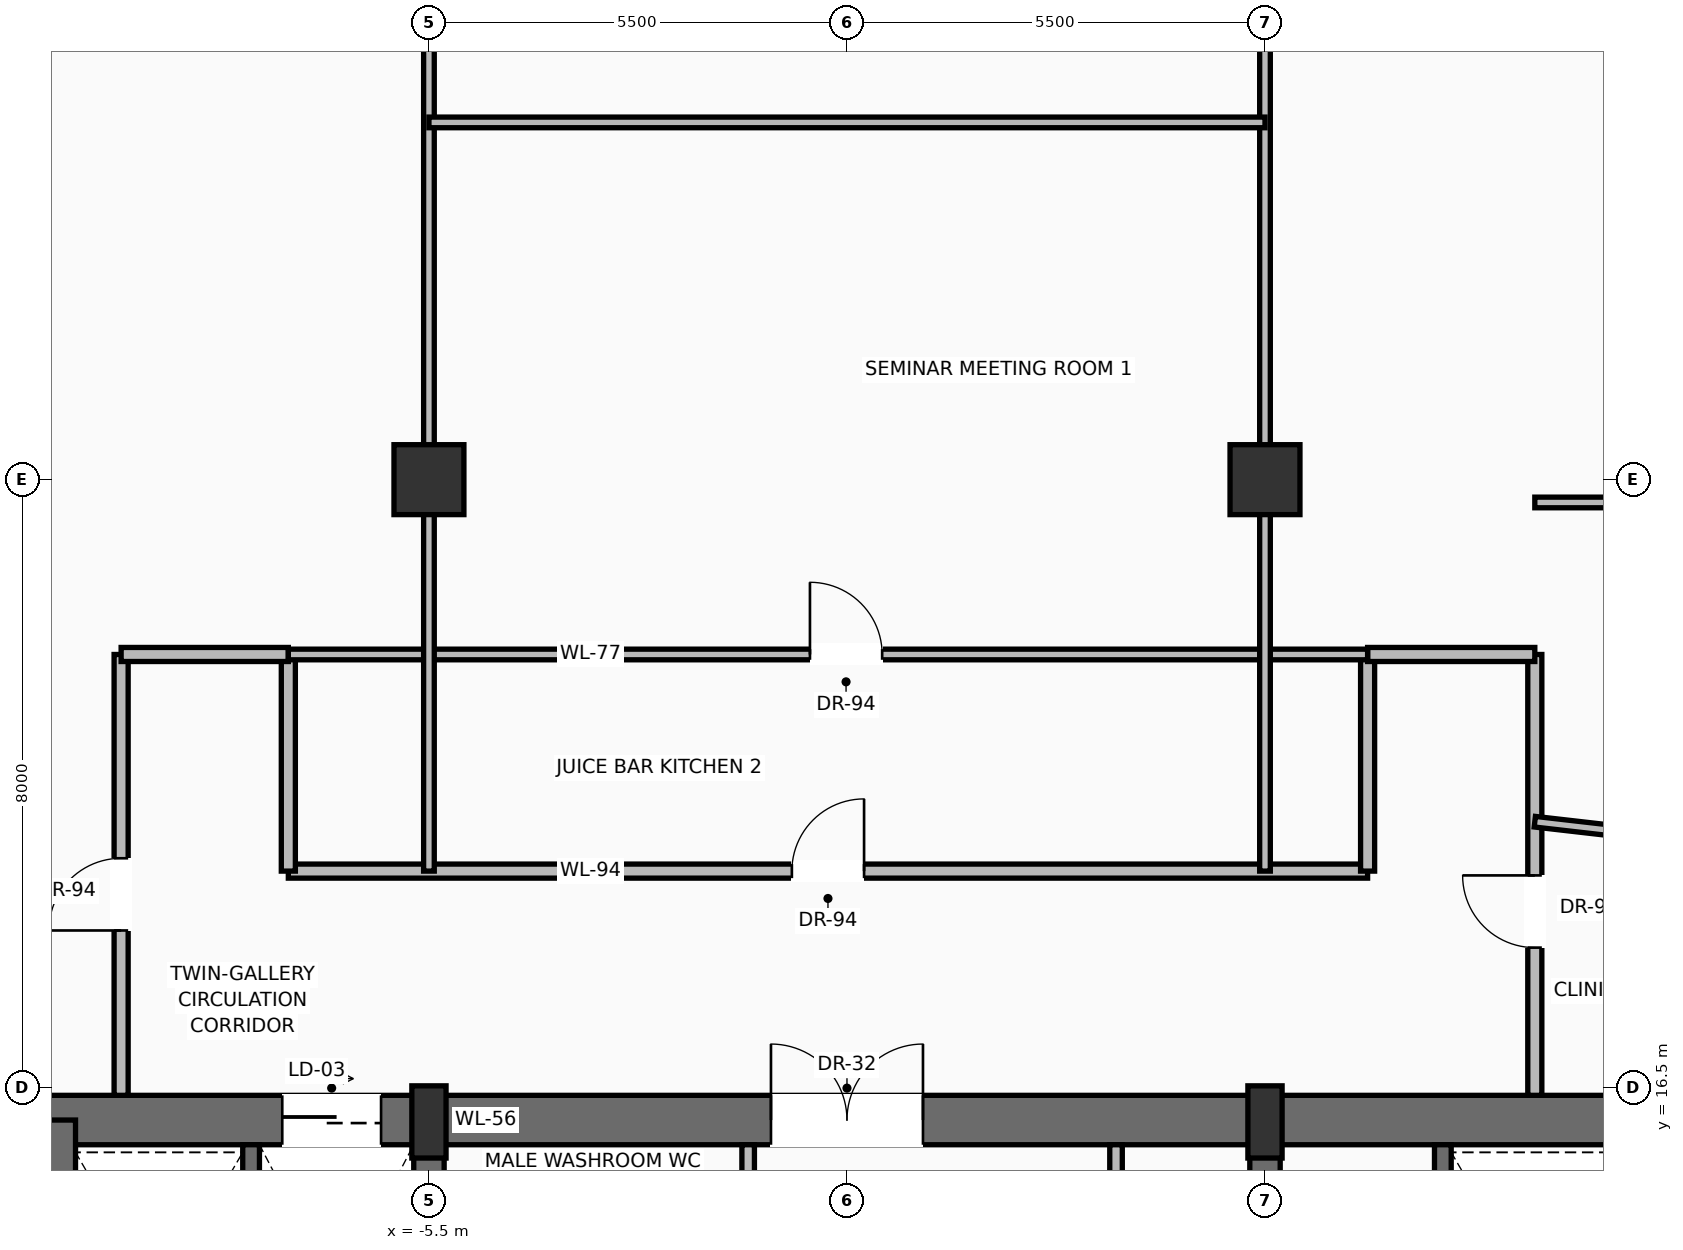
"""IFC4 building model, lengths in metres.
Left out: names, types, materials, properties, quantities, classifications, styles, units other than length and angle.
Written with IfcOpenShell. Run it as: python <this file> out.ifc"""

import sys

from ifc_helpers import new_model, si_unit, direction, frame, frame_2d, origin, origin_2d, place, context, subcontext, project, spatial, rectangle, extrude, source, transform, mapped, element, fill, save


model = new_model("IFC4")
c1 = context("Model", 3, precision=1e-05, world=origin(), true_north=direction((0.0, 1.0)))
c2 = subcontext(c1, "Body", "Model", "MODEL_VIEW")
j1 = project(units=[si_unit("LENGTHUNIT", "METRE"), si_unit("PLANEANGLEUNIT", "RADIAN")], contexts=[c1])
p1 = place(None, origin())
s1 = spatial("IfcSite", under=j1, at=p1, CompositionType="ELEMENT")
p2 = place(p1, origin())
s2 = spatial("IfcBuilding", under=s1, at=p2, CompositionType="ELEMENT")
p3 = place(p2, frame((0.0, 0.0, 196.9)))
s3 = spatial("IfcBuildingStorey", under=s2, at=p3, CompositionType="ELEMENT", Elevation=196.9)
p4 = place(p3, frame((-10.8, 16.075, 0.0), z_axis=(0.0, 0.0, 1.0), x_axis=(1.0, 0.0, 0.0)))
e1 = element("IfcWall", 1, at=p4, inside=s3, PredefinedType="SHEAR", context=c2, shape_type="SweptSolid", body=[
    extrude(rectangle(XDim=21.6, YDim=0.65, at=frame_2d((10.8, 0.0))), origin(), (0.0, 0.0, 1.0), 3.47),
])
p5 = place(p4, frame((3.37, 0.0, 0.0)))
e2 = element("IfcOpeningElement", 2, at=p5, cuts=e1, PredefinedType="OPENING", context=c2, shape_type="SweptSolid", body=[
    extrude(rectangle(XDim=1.3, YDim=2.3, at=frame_2d((0.65, 1.15))), frame((0.0, 0.335, 0.0), z_axis=(0.0, -1.0, 0.0), x_axis=(1.0, 0.0, 0.0)), (0.0, 0.0, 1.0), 0.67),
])
p6 = place(p4, frame((9.8, 0.0, 0.0)))
e3 = element("IfcOpeningElement", 3, at=p6, cuts=e1, PredefinedType="OPENING", context=c2, shape_type="SweptSolid", body=[
    extrude(rectangle(XDim=2.0, YDim=2.4, at=frame_2d((1.0, 1.2))), frame((0.0, 0.335, 0.0), z_axis=(0.0, -1.0, 0.0), x_axis=(1.0, 0.0, 0.0)), (0.0, 0.0, 1.0), 0.67),
])
p7 = place(p3, frame((-10.475, 0.525, 0.0), z_axis=(0.0, 0.0, 1.0), x_axis=(0.0, 1.0, 0.0)))
e4 = element("IfcWall", 4, at=p7, inside=s3, PredefinedType="SHEAR", context=c2, shape_type="SweptSolid", body=[
    extrude(rectangle(XDim=15.55, YDim=0.65, at=frame_2d((7.775, 0.0))), origin(), (0.0, 0.0, 1.0), 3.47),
])
p8 = place(p3, frame((-5.5, 0.525, 0.0), z_axis=(0.0, 0.0, 1.0), x_axis=(0.0, 1.0, 0.0)))
e5 = element("IfcWall", 5, at=p8, inside=s3, PredefinedType="SHEAR", context=c2, shape_type="SweptSolid", body=[
    extrude(rectangle(XDim=15.55, YDim=0.4, at=frame_2d((7.775, 0.0))), origin(), (0.0, 0.0, 1.0), 3.47),
])
p9 = place(p8, frame((8.975, 0.0, 0.0)))
e6 = element("IfcOpeningElement", 6, at=p9, cuts=e5, PredefinedType="OPENING", context=c2, shape_type="SweptSolid", body=[
    extrude(rectangle(XDim=1.1, YDim=2.2, at=frame_2d((0.55, 1.1))), frame((0.0, 0.21, 0.0), z_axis=(0.0, -1.0, 0.0), x_axis=(1.0, 0.0, 0.0)), (0.0, 0.0, 1.0), 0.42),
])
p10 = place(p3, frame((5.5, 0.525, 0.0), z_axis=(0.0, 0.0, 1.0), x_axis=(0.0, 1.0, 0.0)))
e7 = element("IfcWall", 7, at=p10, inside=s3, PredefinedType="SHEAR", context=c2, shape_type="SweptSolid", body=[
    extrude(rectangle(XDim=15.55, YDim=0.4, at=frame_2d((7.775, 0.0))), origin(), (0.0, 0.0, 1.0), 3.47),
])
p11 = place(p10, frame((8.975, 0.0, 0.0)))
e8 = element("IfcOpeningElement", 8, at=p11, cuts=e7, PredefinedType="OPENING", context=c2, shape_type="SweptSolid", body=[
    extrude(rectangle(XDim=1.1, YDim=2.2, at=frame_2d((0.55, 1.1))), frame((0.0, 0.21, 0.0), z_axis=(0.0, -1.0, 0.0), x_axis=(1.0, 0.0, 0.0)), (0.0, 0.0, 1.0), 0.42),
])
m1 = source(origin(), c2, "Body", "SweptSolid", [
    extrude(rectangle(XDim=0.45, YDim=0.95, at=origin_2d()), origin(), (0.0, 0.0, 1.0), 3.7),
])
for number, where, z_axis, x_axis in (
    (9, (-5.5, 16.05, 0.0), (0.0, 0.0, 1.0), (1.0, 0.0, 0.0)),
    (10, (5.5, 16.05, 0.0), (0.0, 0.0, 1.0), (1.0, 0.0, 0.0)),
):
    element("IfcColumn", number, at=place(p3, frame(where, z_axis=z_axis, x_axis=x_axis)), inside=s3, PredefinedType="PILASTER", context=c2, shape_type="MappedRepresentation", body=[
        mapped(m1, transform((0.0, 0.0, 0.0), scale=1.0)),
    ])
m2 = source(origin(), c2, "Body", "SweptSolid", [
    extrude(rectangle(XDim=0.92, YDim=0.92, at=origin_2d()), origin(), (0.0, 0.0, 1.0), 3.7),
])
for number, where, z_axis, x_axis in (
    (11, (-5.5, 24.5, 0.0), (0.0, 0.0, 1.0), (1.0, 0.0, 0.0)),
    (12, (5.5, 24.5, 0.0), (0.0, 0.0, 1.0), (1.0, 0.0, 0.0)),
):
    element("IfcColumn", number, at=place(p3, frame(where, z_axis=z_axis, x_axis=x_axis)), inside=s3, PredefinedType="COLUMN", context=c2, shape_type="MappedRepresentation", body=[
        mapped(m2, transform((0.0, 0.0, 0.0), scale=1.0)),
    ])
p12 = place(p3, frame((-20.217, 16.059, 0.0), z_axis=(0.0, 0.0, 1.0), x_axis=(0.523025539044, 0.852317009984, 0.0)))
e13 = element("IfcWall", 13, at=p12, inside=s3, PredefinedType="SOLIDWALL", context=c2, shape_type="SweptSolid", body=[
    extrude(rectangle(XDim=19.031, YDim=0.28, at=frame_2d((9.516, 0.0))), origin(), (0.0, 0.0, 1.0), 3.05),
])
p13 = place(p12, frame((4.567, 0.0, 0.0)))
e14 = element("IfcOpeningElement", 14, at=p13, cuts=e13, PredefinedType="OPENING", context=c2, shape_type="SweptSolid", body=[
    extrude(rectangle(XDim=1.6, YDim=2.35, at=frame_2d((0.8, 1.175))), frame((0.0, 0.15, 0.0), z_axis=(0.0, -1.0, 0.0), x_axis=(1.0, 0.0, 0.0)), (0.0, 0.0, 1.0), 0.3),
])
p14 = place(p12, frame((12.941, 0.0, 0.9)))
e15 = element("IfcOpeningElement", 15, at=p14, cuts=e13, PredefinedType="OPENING", context=c2, shape_type="SweptSolid", body=[
    extrude(rectangle(XDim=2.0, YDim=1.85, at=frame_2d((1.0, 0.925))), frame((0.0, 0.15, 0.0), z_axis=(0.0, -1.0, 0.0), x_axis=(1.0, 0.0, 0.0)), (0.0, 0.0, 1.0), 0.3),
])
p15 = place(p3, frame((9.62, 32.358, 0.0), z_axis=(0.0, 0.0, 1.0), x_axis=(0.534252973029, -0.845324648174, 0.0)))
e16 = element("IfcWall", 16, at=p15, inside=s3, PredefinedType="SOLIDWALL", context=c2, shape_type="SweptSolid", body=[
    extrude(rectangle(XDim=19.042, YDim=0.28, at=frame_2d((9.521, 0.0))), origin(), (0.0, 0.0, 1.0), 3.05),
])
p16 = place(p15, frame((4.57, 0.0, 0.0)))
e17 = element("IfcOpeningElement", 17, at=p16, cuts=e16, PredefinedType="OPENING", context=c2, shape_type="SweptSolid", body=[
    extrude(rectangle(XDim=1.6, YDim=2.35, at=frame_2d((0.8, 1.175))), frame((0.0, 0.15, 0.0), z_axis=(0.0, -1.0, 0.0), x_axis=(1.0, 0.0, 0.0)), (0.0, 0.0, 1.0), 0.3),
])
p17 = place(p15, frame((12.948, 0.0, 0.9)))
e18 = element("IfcOpeningElement", 18, at=p17, cuts=e16, PredefinedType="OPENING", context=c2, shape_type="SweptSolid", body=[
    extrude(rectangle(XDim=2.0, YDim=1.85, at=frame_2d((1.0, 0.925))), frame((0.0, 0.15, 0.0), z_axis=(0.0, -1.0, 0.0), x_axis=(1.0, 0.0, 0.0)), (0.0, 0.0, 1.0), 0.3),
])
for number, where, z_axis, x_axis in (
    (19, (-7.84, 11.87, 0.0), (0.0, 0.0, 1.0), (0.0, 1.0, 0.0)),
    (20, (7.84, 11.87, 0.0), (0.0, 0.0, 1.0), (0.0, 1.0, 0.0)),
):
    element("IfcWall", number, at=place(p3, frame(where, z_axis=z_axis, x_axis=x_axis)), inside=s3, PredefinedType="SOLIDWALL", context=c2, shape_type="SweptSolid", body=[
        extrude(rectangle(XDim=3.88, YDim=0.22, at=frame_2d((1.94, 0.0))), origin(), (0.0, 0.0, 1.0), 3.47),
    ])
p18 = place(p3, frame((-1.3, 13.6, 0.0), z_axis=(0.0, 0.0, 1.0), x_axis=(0.0, 1.0, 0.0)))
e21 = element("IfcWall", 21, at=p18, inside=s3, PredefinedType="PARTITIONING", context=c2, shape_type="SweptSolid", body=[
    extrude(rectangle(XDim=2.15, YDim=0.165, at=frame_2d((1.075, 0.0))), origin(), (0.0, 0.0, 1.0), 3.462),
])
p19 = place(p18, frame((0.55, 0.0, 0.0)))
e22 = element("IfcOpeningElement", 22, at=p19, cuts=e21, PredefinedType="OPENING", context=c2, shape_type="SweptSolid", body=[
    extrude(rectangle(XDim=0.9, YDim=2.1, at=frame_2d((0.45, 1.05))), frame((0.0, 0.093, 0.0), z_axis=(0.0, -1.0, 0.0), x_axis=(1.0, 0.0, 0.0)), (0.0, 0.0, 1.0), 0.185),
])
p20 = place(p3, frame((3.54, 11.22, 0.0), z_axis=(0.0, 0.0, 1.0), x_axis=(0.0, 1.0, 0.0)))
e23 = element("IfcWall", 23, at=p20, inside=s3, PredefinedType="PARTITIONING", context=c2, shape_type="SweptSolid", body=[
    extrude(rectangle(XDim=4.53, YDim=0.165, at=frame_2d((2.265, 0.0))), origin(), (0.0, 0.0, 1.0), 3.462),
])
p21 = place(p20, frame((1.25, 0.0, 0.0)))
e24 = element("IfcOpeningElement", 24, at=p21, cuts=e23, PredefinedType="OPENING", context=c2, shape_type="SweptSolid", body=[
    extrude(rectangle(XDim=0.9, YDim=2.1, at=frame_2d((0.45, 1.05))), frame((0.0, 0.093, 0.0), z_axis=(0.0, -1.0, 0.0), x_axis=(1.0, 0.0, 0.0)), (0.0, 0.0, 1.0), 0.185),
])
p22 = place(p3, frame((-7.35, 19.35, 0.0), z_axis=(0.0, 0.0, 1.0), x_axis=(1.0, 0.0, 0.0)))
e25 = element("IfcWall", 25, at=p22, inside=s3, PredefinedType="PARTITIONING", context=c2, shape_type="SweptSolid", body=[
    extrude(rectangle(XDim=14.2, YDim=0.185, at=frame_2d((7.1, 0.0))), origin(), (0.0, 0.0, 1.0), 2.846),
])
p23 = place(p22, frame((6.625, 0.0, 0.0)))
e26 = element("IfcOpeningElement", 26, at=p23, cuts=e25, PredefinedType="OPENING", context=c2, shape_type="SweptSolid", body=[
    extrude(rectangle(XDim=0.95, YDim=2.2, at=frame_2d((0.475, 1.1))), frame((0.0, 0.103, 0.0), z_axis=(0.0, -1.0, 0.0), x_axis=(1.0, 0.0, 0.0)), (0.0, 0.0, 1.0), 0.205),
])
for number, where, z_axis, x_axis in (
    (27, (-7.35, 19.35, 0.0), (0.0, 0.0, 1.0), (0.0, 1.0, 0.0)),
    (28, (6.85, 19.35, 0.0), (0.0, 0.0, 1.0), (0.0, 1.0, 0.0)),
):
    element("IfcWall", number, at=place(p3, frame(where, z_axis=z_axis, x_axis=x_axis)), inside=s3, PredefinedType="PARTITIONING", context=c2, shape_type="SweptSolid", body=[
        extrude(rectangle(XDim=2.85, YDim=0.185, at=frame_2d((1.425, 0.0))), origin(), (0.0, 0.0, 1.0), 3.462),
    ])
p24 = place(p3, frame((-9.55, 16.4, 0.0), z_axis=(0.0, 0.0, 1.0), x_axis=(0.0, 1.0, 0.0)))
e29 = element("IfcWall", 29, at=p24, inside=s3, PredefinedType="PARTITIONING", context=c2, shape_type="SweptSolid", body=[
    extrude(rectangle(XDim=5.8, YDim=0.185, at=frame_2d((2.9, 0.0))), origin(), (0.0, 0.0, 1.0), 3.462),
])
p25 = place(p24, frame((2.169, 0.0, 0.0)))
e30 = element("IfcOpeningElement", 30, at=p25, cuts=e29, PredefinedType="OPENING", context=c2, shape_type="SweptSolid", body=[
    extrude(rectangle(XDim=0.95, YDim=2.2, at=frame_2d((0.475, 1.1))), frame((0.0, 0.103, 0.0), z_axis=(0.0, -1.0, 0.0), x_axis=(1.0, 0.0, 0.0)), (0.0, 0.0, 1.0), 0.205),
])
p26 = place(p3, frame((9.05, 16.4, 0.0), z_axis=(0.0, 0.0, 1.0), x_axis=(0.0, 1.0, 0.0)))
e31 = element("IfcWall", 31, at=p26, inside=s3, PredefinedType="PARTITIONING", context=c2, shape_type="SweptSolid", body=[
    extrude(rectangle(XDim=5.8, YDim=0.185, at=frame_2d((2.9, 0.0))), origin(), (0.0, 0.0, 1.0), 3.462),
])
p27 = place(p26, frame((1.943, 0.0, 0.0)))
e32 = element("IfcOpeningElement", 32, at=p27, cuts=e31, PredefinedType="OPENING", context=c2, shape_type="SweptSolid", body=[
    extrude(rectangle(XDim=0.95, YDim=2.2, at=frame_2d((0.475, 1.1))), frame((0.0, 0.103, 0.0), z_axis=(0.0, -1.0, 0.0), x_axis=(1.0, 0.0, 0.0)), (0.0, 0.0, 1.0), 0.205),
])
for number, where, z_axis, x_axis in (
    (33, (-9.55, 22.2, 0.0), (0.0, 0.0, 1.0), (1.0, 0.0, 0.0)),
    (34, (6.85, 22.2, 0.0), (0.0, 0.0, 1.0), (1.0, 0.0, 0.0)),
):
    element("IfcWall", number, at=place(p3, frame(where, z_axis=z_axis, x_axis=x_axis)), inside=s3, PredefinedType="PARTITIONING", context=c2, shape_type="SweptSolid", body=[
        extrude(rectangle(XDim=2.2, YDim=0.185, at=frame_2d((1.1, 0.0))), origin(), (0.0, 0.0, 1.0), 3.049),
    ])
p28 = place(p3, frame((-7.35, 22.2, 0.0), z_axis=(0.0, 0.0, 1.0), x_axis=(1.0, 0.0, 0.0)))
e35 = element("IfcWall", 35, at=p28, inside=s3, PredefinedType="PARTITIONING", context=c2, shape_type="SweptSolid", body=[
    extrude(rectangle(XDim=14.2, YDim=0.14, at=frame_2d((7.1, 0.0))), origin(), (0.0, 0.0, 1.0), 3.049),
])
p29 = place(p28, frame((6.863, 0.0, 0.0)))
e36 = element("IfcOpeningElement", 36, at=p29, cuts=e35, PredefinedType="OPENING", context=c2, shape_type="SweptSolid", body=[
    extrude(rectangle(XDim=0.95, YDim=2.2, at=frame_2d((0.475, 1.1))), frame((0.0, 0.08, 0.0), z_axis=(0.0, -1.0, 0.0), x_axis=(1.0, 0.0, 0.0)), (0.0, 0.0, 1.0), 0.16),
])
for number, where, z_axis, x_axis in (
    (37, (-5.5, 19.35, 0.0), (0.0, 0.0, 1.0), (0.0, 1.0, 0.0)),
    (38, (5.5, 19.35, 0.0), (0.0, 0.0, 1.0), (0.0, 1.0, 0.0)),
):
    element("IfcWall", number, at=place(p3, frame(where, z_axis=z_axis, x_axis=x_axis)), inside=s3, PredefinedType="PARTITIONING", context=c2, shape_type="SweptSolid", body=[
        extrude(rectangle(XDim=13.15, YDim=0.14, at=frame_2d((6.575, 0.0))), origin(), (0.0, 0.0, 1.0), 2.846),
    ])
p30 = place(p3, frame((-5.5, 29.2, 0.0), z_axis=(0.0, 0.0, 1.0), x_axis=(1.0, 0.0, 0.0)))
e39 = element("IfcWall", 39, at=p30, inside=s3, PredefinedType="PARTITIONING", context=c2, shape_type="SweptSolid", body=[
    extrude(rectangle(XDim=11.0, YDim=0.14, at=frame_2d((5.5, 0.0))), origin(), (0.0, 0.0, 1.0), 3.462),
])
p31 = place(p3, frame((9.05, 20.0, 0.0), z_axis=(0.0, 0.0, 1.0), x_axis=(0.993499490383, -0.113836560952, 0.0)))
e40 = element("IfcWall", 40, at=p31, inside=s3, PredefinedType="PARTITIONING", context=c2, shape_type="SweptSolid", body=[
    extrude(rectangle(XDim=9.261, YDim=0.14, at=frame_2d((4.63, 0.0))), origin(), (0.0, 0.0, 1.0), 3.049),
])
p32 = place(p3, frame((9.05, 24.2, 0.0), z_axis=(0.0, 0.0, 1.0), x_axis=(1.0, 0.0, 0.0)))
e41 = element("IfcWall", 41, at=p32, inside=s3, PredefinedType="PARTITIONING", context=c2, shape_type="SweptSolid", body=[
    extrude(rectangle(XDim=5.88, YDim=0.14, at=frame_2d((2.94, 0.0))), origin(), (0.0, 0.0, 1.0), 3.462),
])
m3 = source(origin(), c2, "Body", "SweptSolid", [
    extrude(rectangle(XDim=1.3, YDim=2.3, at=frame_2d((0.65, 1.15))), frame((0.0, 0.025, 0.0), z_axis=(0.0, -1.0, 0.0), x_axis=(1.0, 0.0, 0.0)), (0.0, 0.0, 1.0), 0.05),
])
p33 = place(p5, origin())
e42 = element("IfcDoor", 42, at=p33, inside=s3, OperationType="SLIDING_TO_RIGHT", PredefinedType="DOOR", context=c2, shape_type="MappedRepresentation", body=[
    mapped(m3, transform((0.0, 0.0, 0.0), scale=1.0)),
])
fill(e2, e42)
m4 = source(origin(), c2, "Body", "SweptSolid", [
    extrude(rectangle(XDim=2.0, YDim=2.4, at=frame_2d((1.0, 1.2))), frame((0.0, 0.025, 0.0), z_axis=(0.0, -1.0, 0.0), x_axis=(1.0, 0.0, 0.0)), (0.0, 0.0, 1.0), 0.05),
])
p34 = place(p6, origin())
e43 = element("IfcDoor", 43, at=p34, inside=s3, OperationType="DOUBLE_DOOR_SINGLE_SWING", PredefinedType="DOOR", context=c2, shape_type="MappedRepresentation", body=[
    mapped(m4, transform((0.0, 0.0, 0.0), scale=1.0)),
])
fill(e3, e43)
m5 = source(origin(), c2, "Body", "SweptSolid", [
    extrude(rectangle(XDim=0.95, YDim=2.2, at=frame_2d((0.475, 1.1))), frame((0.0, 0.025, 0.0), z_axis=(0.0, -1.0, 0.0), x_axis=(1.0, 0.0, 0.0)), (0.0, 0.0, 1.0), 0.05),
])
p35 = place(p23, origin())
e44 = element("IfcDoor", 44, at=p35, inside=s3, OperationType="SINGLE_SWING_RIGHT", PredefinedType="DOOR", context=c2, shape_type="MappedRepresentation", body=[
    mapped(m5, transform((0.0, 0.0, 0.0), scale=1.0)),
])
fill(e26, e44)
p36 = place(p25, origin())
e45 = element("IfcDoor", 45, at=p36, inside=s3, OperationType="SINGLE_SWING_LEFT", PredefinedType="DOOR", context=c2, shape_type="MappedRepresentation", body=[
    mapped(m5, transform((0.0, 0.0, 0.0), scale=1.0)),
])
fill(e30, e45)
p37 = place(p27, origin())
e46 = element("IfcDoor", 46, at=p37, inside=s3, OperationType="SINGLE_SWING_RIGHT", PredefinedType="DOOR", context=c2, shape_type="MappedRepresentation", body=[
    mapped(m5, transform((0.0, 0.0, 0.0), scale=1.0)),
])
fill(e32, e46)
p38 = place(p29, origin())
e47 = element("IfcDoor", 47, at=p38, inside=s3, OperationType="SINGLE_SWING_LEFT", PredefinedType="DOOR", context=c2, shape_type="MappedRepresentation", body=[
    mapped(m5, transform((0.0, 0.0, 0.0), scale=1.0)),
])
fill(e36, e47)
save(model, sys.argv[1])
